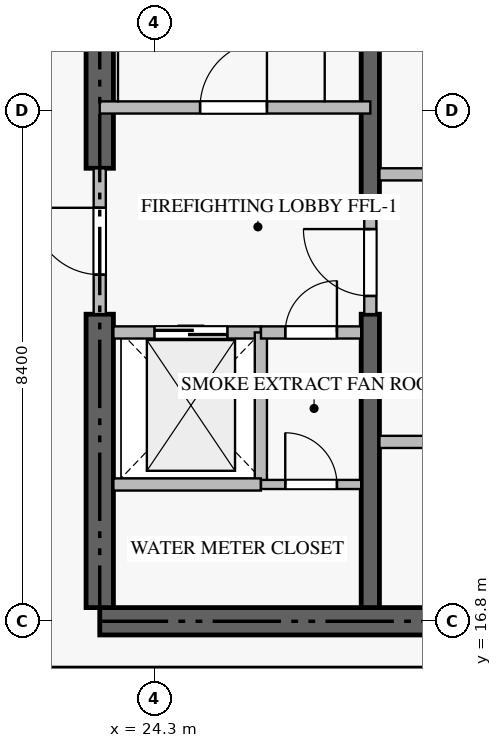
"""IFC4 building model, lengths in metres.
Left out: names, types, materials, properties, quantities, classifications, styles, units other than length and angle.
Written with IfcOpenShell. Run it as: python <this file> out.ifc"""

import sys

from ifc_helpers import new_model, si_unit, direction, frame, frame_2d, origin, place, context, subcontext, project, spatial, rectangle, extrude, source, transform, mapped, element, fill, save


model = new_model("IFC4")
c1 = context("Model", 3, precision=1e-05, world=origin(), true_north=direction((0.0, 1.0)))
c2 = subcontext(c1, "Body", "Model", "MODEL_VIEW")
j1 = project(units=[si_unit("LENGTHUNIT", "METRE"), si_unit("PLANEANGLEUNIT", "RADIAN")], contexts=[c1])
p1 = place(None, origin())
s1 = spatial("IfcSite", under=j1, at=p1, CompositionType="ELEMENT")
p2 = place(p1, origin())
s2 = spatial("IfcBuilding", under=s1, at=p2, CompositionType="ELEMENT")
p3 = place(p2, frame((0.0, 0.0, -7.2)))
s3 = spatial("IfcBuildingStorey", under=s2, at=p3, CompositionType="ELEMENT", Elevation=-7.2)
p4 = place(p3, frame((23.4, 16.8, -0.36), z_axis=(0.0, 0.0, 1.0), x_axis=(1.0, 0.0, 0.0)))
e1 = element("IfcWall", 1, at=p4, inside=s3, PredefinedType="SHEAR", context=c2, shape_type="SweptSolid", body=[
    extrude(rectangle(XDim=18.0, YDim=0.45, at=frame_2d((9.0, 0.0))), origin(), (0.0, 0.0, 1.0), 3.598),
])
p5 = place(p3, frame((23.4, 17.025, -0.36), z_axis=(0.0, 0.0, 1.0), x_axis=(0.0, 1.0, 0.0)))
e2 = element("IfcWall", 2, at=p5, inside=s3, PredefinedType="SHEAR", context=c2, shape_type="SweptSolid", body=[
    extrude(rectangle(XDim=4.825, YDim=0.45, at=frame_2d((2.413, 0.0))), origin(), (0.0, 0.0, 1.0), 3.598),
])
p6 = place(p3, frame((23.4, 24.25, -0.36), z_axis=(0.0, 0.0, 1.0), x_axis=(0.0, 1.0, 0.0)))
e3 = element("IfcWall", 3, at=p6, inside=s3, PredefinedType="SHEAR", context=c2, shape_type="SweptSolid", body=[
    extrude(rectangle(XDim=9.125, YDim=0.45, at=frame_2d((4.562, 0.0))), origin(), (0.0, 0.0, 1.0), 3.598),
])
p7 = place(p3, frame((27.85, 17.025, -0.36), z_axis=(0.0, 0.0, 1.0), x_axis=(0.0, 1.0, 0.0)))
e4 = element("IfcWall", 4, at=p7, inside=s3, PredefinedType="SHEAR", context=c2, shape_type="SweptSolid", body=[
    extrude(rectangle(XDim=4.825, YDim=0.3, at=frame_2d((2.413, 0.0))), origin(), (0.0, 0.0, 1.0), 3.598),
])
p8 = place(p3, frame((27.85, 23.55, -0.36), z_axis=(0.0, 0.0, 1.0), x_axis=(0.0, 1.0, 0.0)))
e5 = element("IfcWall", 5, at=p8, inside=s3, PredefinedType="SHEAR", context=c2, shape_type="SweptSolid", body=[
    extrude(rectangle(XDim=9.825, YDim=0.3, at=frame_2d((4.913, 0.0))), origin(), (0.0, 0.0, 1.0), 3.598),
])
p9 = place(p3, frame((23.4, 25.25, 0.0), z_axis=(0.0, 0.0, 1.0), x_axis=(1.0, 0.0, 0.0)))
e6 = element("IfcWall", 6, at=p9, inside=s3, PredefinedType="STANDARD", context=c2, shape_type="SweptSolid", body=[
    extrude(rectangle(XDim=4.45, YDim=0.2, at=frame_2d((2.225, 0.0))), origin(), (0.0, 0.0, 1.0), 3.24),
])
p10 = place(p9, frame((1.65, 0.0, 0.0)))
e7 = element("IfcOpeningElement", 7, at=p10, cuts=e6, PredefinedType="OPENING", context=c2, shape_type="SweptSolid", body=[
    extrude(rectangle(XDim=1.1, YDim=2.15, at=frame_2d((0.55, 1.075))), frame((0.0, 0.11, 0.0), z_axis=(0.0, -1.0, 0.0), x_axis=(1.0, 0.0, 0.0)), (0.0, 0.0, 1.0), 0.22),
])
p11 = place(p3, frame((23.625, 21.55, 0.0), z_axis=(0.0, 0.0, 1.0), x_axis=(1.0, 0.0, 0.0)))
e8 = element("IfcWall", 8, at=p11, inside=s3, PredefinedType="STANDARD", context=c2, shape_type="SweptSolid", body=[
    extrude(rectangle(XDim=2.425, YDim=0.2, at=frame_2d((1.212, 0.0))), origin(), (0.0, 0.0, 1.0), 3.24),
])
p12 = place(p11, frame((0.675, 0.0, 0.0)))
e9 = element("IfcOpeningElement", 9, at=p12, cuts=e8, PredefinedType="OPENING", context=c2, shape_type="SweptSolid", body=[
    extrude(rectangle(XDim=1.2, YDim=2.2, at=frame_2d((0.6, 1.1))), frame((0.0, 0.11, 0.0), z_axis=(0.0, -1.0, 0.0), x_axis=(1.0, 0.0, 0.0)), (0.0, 0.0, 1.0), 0.22),
])
p13 = place(p3, frame((26.05, 19.05, 0.0), z_axis=(0.0, 0.0, 1.0), x_axis=(0.0, 1.0, 0.0)))
e10 = element("IfcWall", 10, at=p13, inside=s3, PredefinedType="STANDARD", context=c2, shape_type="SweptSolid", body=[
    extrude(rectangle(XDim=2.5, YDim=0.2, at=frame_2d((1.25, 0.0))), origin(), (0.0, 0.0, 1.0), 3.24),
])
p14 = place(p3, frame((23.625, 19.05, 0.0), z_axis=(0.0, 0.0, 1.0), x_axis=(1.0, 0.0, 0.0)))
e11 = element("IfcWall", 11, at=p14, inside=s3, PredefinedType="STANDARD", context=c2, shape_type="SweptSolid", body=[
    extrude(rectangle(XDim=2.425, YDim=0.2, at=frame_2d((1.212, 0.0))), origin(), (0.0, 0.0, 1.0), 3.24),
])
p15 = place(p3, frame((26.052, 21.55, 0.0), z_axis=(0.0, 0.0, 1.0), x_axis=(1.0, 0.0, 0.0)))
e12 = element("IfcWall", 12, at=p15, inside=s3, PredefinedType="STANDARD", context=c2, shape_type="SweptSolid", body=[
    extrude(rectangle(XDim=1.648, YDim=0.2, at=frame_2d((0.824, 0.0))), origin(), (0.0, 0.0, 1.0), 3.24),
])
p16 = place(p15, frame((0.399, 0.0, 0.0)))
e13 = element("IfcOpeningElement", 13, at=p16, cuts=e12, PredefinedType="OPENING", context=c2, shape_type="SweptSolid", body=[
    extrude(rectangle(XDim=0.85, YDim=2.1, at=frame_2d((0.425, 1.05))), frame((0.0, 0.11, 0.0), z_axis=(0.0, -1.0, 0.0), x_axis=(1.0, 0.0, 0.0)), (0.0, 0.0, 1.0), 0.22),
])
p17 = place(p3, frame((23.4, 21.852, 0.0), z_axis=(0.0, 0.0, 1.0), x_axis=(0.0, 1.0, 0.0)))
e14 = element("IfcWall", 14, at=p17, inside=s3, PredefinedType="STANDARD", context=c2, shape_type="SweptSolid", body=[
    extrude(rectangle(XDim=2.396, YDim=0.2, at=frame_2d((1.198, 0.0))), origin(), (0.0, 0.0, 1.0), 3.24),
])
p18 = place(p17, frame((0.648, 0.0, 0.0)))
e15 = element("IfcOpeningElement", 15, at=p18, cuts=e14, PredefinedType="OPENING", context=c2, shape_type="SweptSolid", body=[
    extrude(rectangle(XDim=1.1, YDim=2.15, at=frame_2d((0.55, 1.075))), frame((0.0, 0.11, 0.0), z_axis=(0.0, -1.0, 0.0), x_axis=(1.0, 0.0, 0.0)), (0.0, 0.0, 1.0), 0.22),
])
p19 = place(p3, frame((27.85, 21.852, 0.0), z_axis=(0.0, 0.0, 1.0), x_axis=(0.0, 1.0, 0.0)))
e16 = element("IfcWall", 16, at=p19, inside=s3, PredefinedType="STANDARD", context=c2, shape_type="SweptSolid", body=[
    extrude(rectangle(XDim=1.696, YDim=0.2, at=frame_2d((0.848, 0.0))), origin(), (0.0, 0.0, 1.0), 3.24),
])
p20 = place(p19, frame((0.298, 0.0, 0.0)))
e17 = element("IfcOpeningElement", 17, at=p20, cuts=e16, PredefinedType="OPENING", context=c2, shape_type="SweptSolid", body=[
    extrude(rectangle(XDim=1.1, YDim=2.15, at=frame_2d((0.55, 1.075))), frame((0.0, 0.11, 0.0), z_axis=(0.0, -1.0, 0.0), x_axis=(1.0, 0.0, 0.0)), (0.0, 0.0, 1.0), 0.22),
])
p21 = place(p3, frame((28.0, 19.75, 0.0), z_axis=(0.0, 0.0, 1.0), x_axis=(1.0, 0.0, 0.0)))
e18 = element("IfcWall", 18, at=p21, inside=s3, PredefinedType="STANDARD", context=c2, shape_type="SweptSolid", body=[
    extrude(rectangle(XDim=8.8, YDim=0.2, at=frame_2d((4.4, 0.0))), origin(), (0.0, 0.0, 1.0), 3.24),
])
p22 = place(p21, frame((3.95, 0.0, 0.0)))
e19 = element("IfcOpeningElement", 19, at=p22, cuts=e18, PredefinedType="OPENING", context=c2, shape_type="SweptSolid", body=[
    extrude(rectangle(XDim=0.9, YDim=2.1, at=frame_2d((0.45, 1.05))), frame((0.0, 0.11, 0.0), z_axis=(0.0, -1.0, 0.0), x_axis=(1.0, 0.0, 0.0)), (0.0, 0.0, 1.0), 0.22),
])
p23 = place(p3, frame((28.0, 24.15, 0.0), z_axis=(0.0, 0.0, 1.0), x_axis=(1.0, 0.0, 0.0)))
e20 = element("IfcWall", 20, at=p23, inside=s3, PredefinedType="STANDARD", context=c2, shape_type="SweptSolid", body=[
    extrude(rectangle(XDim=6.95, YDim=0.2, at=frame_2d((3.475, 0.0))), origin(), (0.0, 0.0, 1.0), 3.24),
])
p24 = place(p3, frame((26.052, 19.05, 0.0), z_axis=(0.0, 0.0, 1.0), x_axis=(1.0, 0.0, 0.0)))
e21 = element("IfcWall", 21, at=p24, inside=s3, PredefinedType="PARTITIONING", context=c2, shape_type="SweptSolid", body=[
    extrude(rectangle(XDim=1.648, YDim=0.15, at=frame_2d((0.824, 0.0))), origin(), (0.0, 0.0, 1.0), 3.24),
])
p25 = place(p24, frame((0.399, 0.0, 0.0)))
e22 = element("IfcOpeningElement", 22, at=p25, cuts=e21, PredefinedType="OPENING", context=c2, shape_type="SweptSolid", body=[
    extrude(rectangle(XDim=0.85, YDim=2.1, at=frame_2d((0.425, 1.05))), frame((0.0, 0.085, 0.0), z_axis=(0.0, -1.0, 0.0), x_axis=(1.0, 0.0, 0.0)), (0.0, 0.0, 1.0), 0.17),
])
m1 = source(origin(), c2, "Body", "SweptSolid", [
    extrude(rectangle(XDim=1.1, YDim=2.15, at=frame_2d((0.55, 1.075))), frame((0.0, 0.025, 0.0), z_axis=(0.0, -1.0, 0.0), x_axis=(1.0, 0.0, 0.0)), (0.0, 0.0, 1.0), 0.05),
])
p26 = place(p10, origin())
e23 = element("IfcDoor", 23, at=p26, inside=s3, OperationType="SINGLE_SWING_RIGHT", PredefinedType="DOOR", context=c2, shape_type="MappedRepresentation", body=[
    mapped(m1, transform((0.0, 0.0, 0.0), scale=1.0)),
])
fill(e7, e23)
m2 = source(origin(), c2, "Body", "SweptSolid", [
    extrude(rectangle(XDim=1.2, YDim=2.2, at=frame_2d((0.6, 1.1))), frame((0.0, 0.025, 0.0), z_axis=(0.0, -1.0, 0.0), x_axis=(1.0, 0.0, 0.0)), (0.0, 0.0, 1.0), 0.05),
])
p27 = place(p12, origin())
e24 = element("IfcDoor", 24, at=p27, inside=s3, OperationType="DOUBLE_DOOR_SLIDING", PredefinedType="DOOR", context=c2, shape_type="MappedRepresentation", body=[
    mapped(m2, transform((0.0, 0.0, 0.0), scale=1.0)),
])
fill(e9, e24)
m3 = source(origin(), c2, "Body", "SweptSolid", [
    extrude(rectangle(XDim=0.85, YDim=2.1, at=frame_2d((0.425, 1.05))), frame((0.0, 0.025, 0.0), z_axis=(0.0, -1.0, 0.0), x_axis=(1.0, 0.0, 0.0)), (0.0, 0.0, 1.0), 0.05),
])
p28 = place(p16, origin())
e25 = element("IfcDoor", 25, at=p28, inside=s3, OperationType="SINGLE_SWING_RIGHT", PredefinedType="DOOR", context=c2, shape_type="MappedRepresentation", body=[
    mapped(m3, transform((0.0, 0.0, 0.0), scale=1.0)),
])
fill(e13, e25)
p29 = place(p18, origin())
e26 = element("IfcDoor", 26, at=p29, inside=s3, OperationType="SINGLE_SWING_RIGHT", PredefinedType="DOOR", context=c2, shape_type="MappedRepresentation", body=[
    mapped(m1, transform((0.0, 0.0, 0.0), scale=1.0)),
])
fill(e15, e26)
p30 = place(p20, origin())
e27 = element("IfcDoor", 27, at=p30, inside=s3, OperationType="SINGLE_SWING_RIGHT", PredefinedType="DOOR", context=c2, shape_type="MappedRepresentation", body=[
    mapped(m1, transform((0.0, 0.0, 0.0), scale=1.0)),
])
fill(e17, e27)
p31 = place(p25, origin())
e28 = element("IfcDoor", 28, at=p31, inside=s3, OperationType="SINGLE_SWING_LEFT", PredefinedType="DOOR", context=c2, shape_type="MappedRepresentation", body=[
    mapped(m3, transform((0.0, 0.0, 0.0), scale=1.0)),
])
fill(e22, e28)
save(model, sys.argv[1])
